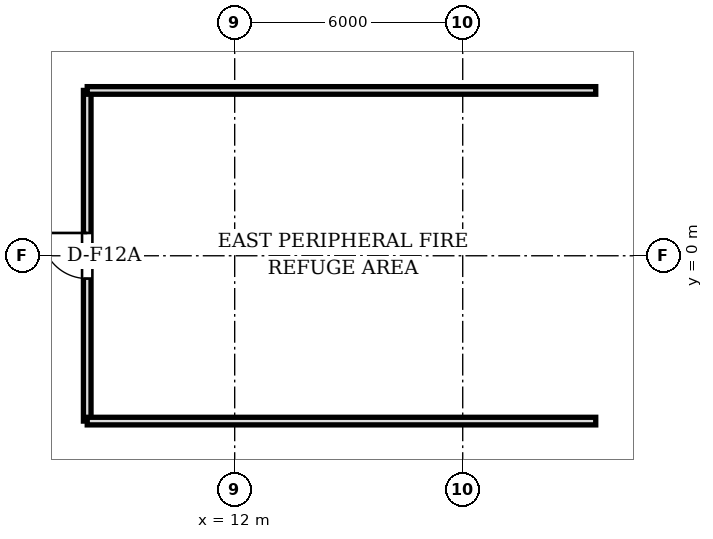
"""IFC4 building model, lengths in metres.
Left out: names, types, materials, properties, quantities, classifications, styles, units other than length and angle.
Written with IfcOpenShell. Run it as: python <this file> out.ifc"""

import sys

from ifc_helpers import new_model, si_unit, direction, frame, frame_2d, origin, origin_2d, place, context, subcontext, project, spatial, rectangle, extrude, source, transform, mapped, element, fill, save


model = new_model("IFC4")
c1 = context("Model", 3, precision=1e-05, world=origin(), true_north=direction((0.0, 1.0)))
c2 = subcontext(c1, "Body", "Model", "MODEL_VIEW")
j1 = project(units=[si_unit("LENGTHUNIT", "METRE"), si_unit("PLANEANGLEUNIT", "RADIAN")], contexts=[c1])
p1 = place(None, origin())
s1 = spatial("IfcSite", under=j1, at=p1, CompositionType="ELEMENT")
p2 = place(p1, origin())
s2 = spatial("IfcBuilding", under=s1, at=p2, CompositionType="ELEMENT")
p3 = place(p2, frame((0.0, 0.0, 74.5)))
s3 = spatial("IfcBuildingStorey", under=s2, at=p3, CompositionType="ELEMENT", Elevation=74.5)
p4 = place(p3, frame((8.12, -4.35, 0.0), z_axis=(0.0, 0.0, 1.0), x_axis=(0.0, 1.0, 0.0)))
e1 = element("IfcWall", 1, at=p4, inside=s3, PredefinedType="SOLIDWALL", context=c2, shape_type="SweptSolid", body=[
    extrude(rectangle(XDim=8.7, YDim=0.2, at=frame_2d((4.35, 0.0))), origin(), (0.0, 0.0, 1.0), 3.73),
])
p5 = place(p4, frame((3.75, 0.0, 0.0)))
e2 = element("IfcOpeningElement", 2, at=p5, cuts=e1, PredefinedType="OPENING", context=c2, shape_type="SweptSolid", body=[
    extrude(rectangle(XDim=1.2, YDim=2.2, at=frame_2d((0.6, 1.1))), frame((0.0, 0.11, 0.0), z_axis=(0.0, -1.0, 0.0), x_axis=(1.0, 0.0, 0.0)), (0.0, 0.0, 1.0), 0.22),
])
for number, where, z_axis, x_axis in (
    (3, (8.12, 4.35, 0.0), (0.0, 0.0, 1.0), (1.0, 0.0, 0.0)),
    (4, (8.12, -4.35, 0.0), (0.0, 0.0, 1.0), (1.0, 0.0, 0.0)),
):
    element("IfcWall", number, at=place(p3, frame(where, z_axis=z_axis, x_axis=x_axis)), inside=s3, PredefinedType="SOLIDWALL", context=c2, shape_type="SweptSolid", body=[
        extrude(rectangle(XDim=13.38, YDim=0.2, at=frame_2d((6.69, 0.0))), origin(), (0.0, 0.0, 1.0), 2.65),
    ])
m1 = source(origin(), c2, "Body", "SweptSolid", [
    extrude(rectangle(XDim=1.2, YDim=0.05, at=origin_2d()), origin(), (0.0, 0.0, 1.0), 2.2),
])
p6 = place(p5, frame((0.6, 0.0, 0.0)))
e5 = element("IfcDoor", 5, at=p6, inside=s3, OperationType="SINGLE_SWING_RIGHT", PredefinedType="DOOR", context=c2, shape_type="MappedRepresentation", body=[
    mapped(m1, transform((0.0, 0.0, 0.0), scale=1.0)),
])
fill(e2, e5)
save(model, sys.argv[1])
